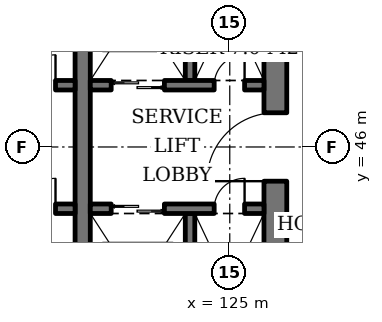
"""IFC4 building model, lengths in metres.
Left out: names, types, materials, properties, quantities, classifications, styles, units other than length and angle.
Written with IfcOpenShell. Run it as: python <this file> out.ifc"""

import sys

from ifc_helpers import new_model, si_unit, direction, frame, frame_2d, origin, place, context, subcontext, project, spatial, rectangle, extrude, element, fill, save


model = new_model("IFC4")
c1 = context("Model", 3, precision=1e-05, world=origin(), true_north=direction((0.0, 1.0)))
c2 = subcontext(c1, "Body", "Model", "MODEL_VIEW")
j1 = project(units=[si_unit("LENGTHUNIT", "METRE"), si_unit("PLANEANGLEUNIT", "RADIAN")], contexts=[c1])
p1 = place(None, origin())
s1 = spatial("IfcSite", under=j1, at=p1, CompositionType="ELEMENT")
p2 = place(p1, origin())
s2 = spatial("IfcBuilding", under=s1, at=p2, CompositionType="ELEMENT")
p3 = place(p2, origin())
s3 = spatial("IfcBuildingStorey", under=s2, at=p3, CompositionType="ELEMENT", Elevation=0.0)
p4 = place(p3, frame((126.2, 37.1, 0.0), z_axis=(0.0, 0.0, 1.0), x_axis=(0.0, 1.0, 0.0)))
e1 = element("IfcWall", 1, at=p4, inside=s3, PredefinedType="SHEAR", context=c2, shape_type="SweptSolid", body=[
    extrude(rectangle(XDim=17.8, YDim=0.6, at=frame_2d((8.9, 0.0))), origin(), (0.0, 0.0, 1.0), 6.0),
])
p5 = place(p4, frame((8.0, 0.0, 0.0)))
e2 = element("IfcOpeningElement", 2, at=p5, cuts=e1, PredefinedType="OPENING", context=c2, shape_type="SweptSolid", body=[
    extrude(rectangle(XDim=1.8, YDim=2.4, at=frame_2d((0.9, 1.2))), frame((0.0, 0.31, 0.0), z_axis=(0.0, -1.0, 0.0), x_axis=(1.0, 0.0, 0.0)), (0.0, 0.0, 1.0), 0.62),
])
p6 = place(p3, frame((121.13, 40.4, 0.0), z_axis=(0.0, 0.0, 1.0), x_axis=(0.0, 1.0, 0.0)))
e3 = element("IfcWall", 3, at=p6, inside=s3, PredefinedType="SHEAR", context=c2, shape_type="SweptSolid", body=[
    extrude(rectangle(XDim=11.2, YDim=0.4, at=frame_2d((5.6, 0.0))), origin(), (0.0, 0.0, 1.0), 6.0),
])
p7 = place(p3, frame((108.1, 47.625, 0.0), z_axis=(0.0, 0.0, 1.0), x_axis=(1.0, 0.0, 0.0)))
e4 = element("IfcWall", 4, at=p7, inside=s3, PredefinedType="SHEAR", context=c2, shape_type="SweptSolid", body=[
    extrude(rectangle(XDim=12.83, YDim=0.25, at=frame_2d((6.415, 0.0))), origin(), (0.0, 0.0, 1.0), 6.0),
])
p8 = place(p7, frame((0.7, 0.0, 0.0)))
e5 = element("IfcOpeningElement", 5, at=p8, cuts=e4, PredefinedType="OPENING", context=c2, shape_type="SweptSolid", body=[
    extrude(rectangle(XDim=1.1, YDim=2.2, at=frame_2d((0.55, 1.1))), frame((0.0, 0.135, 0.0), z_axis=(0.0, -1.0, 0.0), x_axis=(1.0, 0.0, 0.0)), (0.0, 0.0, 1.0), 0.27),
])
p9 = place(p7, frame((3.45, 0.0, 0.0)))
e6 = element("IfcOpeningElement", 6, at=p9, cuts=e4, PredefinedType="OPENING", context=c2, shape_type="SweptSolid", body=[
    extrude(rectangle(XDim=1.1, YDim=2.2, at=frame_2d((0.55, 1.1))), frame((0.0, 0.135, 0.0), z_axis=(0.0, -1.0, 0.0), x_axis=(1.0, 0.0, 0.0)), (0.0, 0.0, 1.0), 0.27),
])
p10 = place(p7, frame((6.2, 0.0, 0.0)))
e7 = element("IfcOpeningElement", 7, at=p10, cuts=e4, PredefinedType="OPENING", context=c2, shape_type="SweptSolid", body=[
    extrude(rectangle(XDim=1.1, YDim=2.2, at=frame_2d((0.55, 1.1))), frame((0.0, 0.135, 0.0), z_axis=(0.0, -1.0, 0.0), x_axis=(1.0, 0.0, 0.0)), (0.0, 0.0, 1.0), 0.27),
])
p11 = place(p7, frame((8.95, 0.0, 0.0)))
e8 = element("IfcOpeningElement", 8, at=p11, cuts=e4, PredefinedType="OPENING", context=c2, shape_type="SweptSolid", body=[
    extrude(rectangle(XDim=1.1, YDim=2.2, at=frame_2d((0.55, 1.1))), frame((0.0, 0.135, 0.0), z_axis=(0.0, -1.0, 0.0), x_axis=(1.0, 0.0, 0.0)), (0.0, 0.0, 1.0), 0.27),
])
p12 = place(p7, frame((11.515, 0.0, 0.0)))
e9 = element("IfcOpeningElement", 9, at=p12, cuts=e4, PredefinedType="OPENING", context=c2, shape_type="SweptSolid", body=[
    extrude(rectangle(XDim=0.8, YDim=2.0, at=frame_2d((0.4, 1.0))), frame((0.0, 0.135, 0.0), z_axis=(0.0, -1.0, 0.0), x_axis=(1.0, 0.0, 0.0)), (0.0, 0.0, 1.0), 0.27),
])
p13 = place(p3, frame((108.1, 44.375, 0.0), z_axis=(0.0, 0.0, 1.0), x_axis=(1.0, 0.0, 0.0)))
e10 = element("IfcWall", 10, at=p13, inside=s3, PredefinedType="SHEAR", context=c2, shape_type="SweptSolid", body=[
    extrude(rectangle(XDim=12.83, YDim=0.25, at=frame_2d((6.415, 0.0))), origin(), (0.0, 0.0, 1.0), 6.0),
])
p14 = place(p13, frame((0.7, 0.0, 0.0)))
e11 = element("IfcOpeningElement", 11, at=p14, cuts=e10, PredefinedType="OPENING", context=c2, shape_type="SweptSolid", body=[
    extrude(rectangle(XDim=1.1, YDim=2.2, at=frame_2d((0.55, 1.1))), frame((0.0, 0.135, 0.0), z_axis=(0.0, -1.0, 0.0), x_axis=(1.0, 0.0, 0.0)), (0.0, 0.0, 1.0), 0.27),
])
p15 = place(p13, frame((3.45, 0.0, 0.0)))
e12 = element("IfcOpeningElement", 12, at=p15, cuts=e10, PredefinedType="OPENING", context=c2, shape_type="SweptSolid", body=[
    extrude(rectangle(XDim=1.1, YDim=2.2, at=frame_2d((0.55, 1.1))), frame((0.0, 0.135, 0.0), z_axis=(0.0, -1.0, 0.0), x_axis=(1.0, 0.0, 0.0)), (0.0, 0.0, 1.0), 0.27),
])
p16 = place(p13, frame((6.2, 0.0, 0.0)))
e13 = element("IfcOpeningElement", 13, at=p16, cuts=e10, PredefinedType="OPENING", context=c2, shape_type="SweptSolid", body=[
    extrude(rectangle(XDim=1.1, YDim=2.2, at=frame_2d((0.55, 1.1))), frame((0.0, 0.135, 0.0), z_axis=(0.0, -1.0, 0.0), x_axis=(1.0, 0.0, 0.0)), (0.0, 0.0, 1.0), 0.27),
])
p17 = place(p13, frame((9.0, 0.0, 0.0)))
e14 = element("IfcOpeningElement", 14, at=p17, cuts=e10, PredefinedType="OPENING", context=c2, shape_type="SweptSolid", body=[
    extrude(rectangle(XDim=1.0, YDim=2.1, at=frame_2d((0.5, 1.05))), frame((0.0, 0.135, 0.0), z_axis=(0.0, -1.0, 0.0), x_axis=(1.0, 0.0, 0.0)), (0.0, 0.0, 1.0), 0.27),
])
p18 = place(p13, frame((11.515, 0.0, 0.0)))
e15 = element("IfcOpeningElement", 15, at=p18, cuts=e10, PredefinedType="OPENING", context=c2, shape_type="SweptSolid", body=[
    extrude(rectangle(XDim=0.8, YDim=2.0, at=frame_2d((0.4, 1.0))), frame((0.0, 0.135, 0.0), z_axis=(0.0, -1.0, 0.0), x_axis=(1.0, 0.0, 0.0)), (0.0, 0.0, 1.0), 0.27),
])
p19 = place(p3, frame((123.955, 47.75, 0.0), z_axis=(0.0, 0.0, 1.0), x_axis=(0.0, 1.0, 0.0)))
e16 = element("IfcWall", 16, at=p19, inside=s3, PredefinedType="SHEAR", context=c2, shape_type="SweptSolid", body=[
    extrude(rectangle(XDim=3.85, YDim=0.25, at=frame_2d((1.925, 0.0))), origin(), (0.0, 0.0, 1.0), 6.0),
])
p20 = place(p3, frame((121.33, 47.625, 0.0), z_axis=(0.0, 0.0, 1.0), x_axis=(1.0, 0.0, 0.0)))
e17 = element("IfcWall", 17, at=p20, inside=s3, PredefinedType="SHEAR", context=c2, shape_type="SweptSolid", body=[
    extrude(rectangle(XDim=4.57, YDim=0.25, at=frame_2d((2.285, 0.0))), origin(), (0.0, 0.0, 1.0), 6.0),
])
p21 = place(p20, frame((0.55, 0.0, 0.0)))
e18 = element("IfcOpeningElement", 18, at=p21, cuts=e17, PredefinedType="OPENING", context=c2, shape_type="SweptSolid", body=[
    extrude(rectangle(XDim=1.4, YDim=2.4, at=frame_2d((0.7, 1.2))), frame((0.0, 0.135, 0.0), z_axis=(0.0, -1.0, 0.0), x_axis=(1.0, 0.0, 0.0)), (0.0, 0.0, 1.0), 0.27),
])
p22 = place(p20, frame((3.26, 0.0, 0.0)))
e19 = element("IfcOpeningElement", 19, at=p22, cuts=e17, PredefinedType="OPENING", context=c2, shape_type="SweptSolid", body=[
    extrude(rectangle(XDim=0.8, YDim=2.0, at=frame_2d((0.4, 1.0))), frame((0.0, 0.135, 0.0), z_axis=(0.0, -1.0, 0.0), x_axis=(1.0, 0.0, 0.0)), (0.0, 0.0, 1.0), 0.27),
])
p23 = place(p3, frame((123.955, 44.25, 0.0), z_axis=(0.0, 0.0, 1.0), x_axis=(0.0, -1.0, 0.0)))
e20 = element("IfcWall", 20, at=p23, inside=s3, PredefinedType="SHEAR", context=c2, shape_type="SweptSolid", body=[
    extrude(rectangle(XDim=3.85, YDim=0.25, at=frame_2d((1.925, 0.0))), origin(), (0.0, 0.0, 1.0), 6.0),
])
p24 = place(p3, frame((121.33, 44.375, 0.0), z_axis=(0.0, 0.0, 1.0), x_axis=(1.0, 0.0, 0.0)))
e21 = element("IfcWall", 21, at=p24, inside=s3, PredefinedType="SHEAR", context=c2, shape_type="SweptSolid", body=[
    extrude(rectangle(XDim=4.57, YDim=0.25, at=frame_2d((2.285, 0.0))), origin(), (0.0, 0.0, 1.0), 6.0),
])
p25 = place(p24, frame((0.55, 0.0, 0.0)))
e22 = element("IfcOpeningElement", 22, at=p25, cuts=e21, PredefinedType="OPENING", context=c2, shape_type="SweptSolid", body=[
    extrude(rectangle(XDim=1.4, YDim=2.4, at=frame_2d((0.7, 1.2))), frame((0.0, 0.135, 0.0), z_axis=(0.0, -1.0, 0.0), x_axis=(1.0, 0.0, 0.0)), (0.0, 0.0, 1.0), 0.27),
])
p26 = place(p24, frame((3.26, 0.0, 0.0)))
e23 = element("IfcOpeningElement", 23, at=p26, cuts=e21, PredefinedType="OPENING", context=c2, shape_type="SweptSolid", body=[
    extrude(rectangle(XDim=0.8, YDim=2.0, at=frame_2d((0.4, 1.0))), frame((0.0, 0.135, 0.0), z_axis=(0.0, -1.0, 0.0), x_axis=(1.0, 0.0, 0.0)), (0.0, 0.0, 1.0), 0.27),
])
p27 = place(p12, origin())
e24 = element("IfcDoor", 24, at=p27, inside=s3, OperationType="SINGLE_SWING_RIGHT", PredefinedType="DOOR", context=c2, shape_type="SweptSolid", body=[
    extrude(rectangle(XDim=0.8, YDim=2.0, at=frame_2d((0.4, 1.0))), frame((0.0, 0.025, 0.0), z_axis=(0.0, -1.0, 0.0), x_axis=(1.0, 0.0, 0.0)), (0.0, 0.0, 1.0), 0.05),
])
fill(e9, e24)
p28 = place(p18, origin())
e25 = element("IfcDoor", 25, at=p28, inside=s3, OperationType="SINGLE_SWING_RIGHT", PredefinedType="DOOR", context=c2, shape_type="SweptSolid", body=[
    extrude(rectangle(XDim=0.8, YDim=2.0, at=frame_2d((0.4, 1.0))), frame((0.0, 0.025, 0.0), z_axis=(0.0, -1.0, 0.0), x_axis=(1.0, 0.0, 0.0)), (0.0, 0.0, 1.0), 0.05),
])
fill(e15, e25)
p29 = place(p21, origin())
e26 = element("IfcDoor", 26, at=p29, inside=s3, OperationType="DOUBLE_DOOR_SLIDING", PredefinedType="DOOR", context=c2, shape_type="SweptSolid", body=[
    extrude(rectangle(XDim=1.4, YDim=2.4, at=frame_2d((0.7, 1.2))), frame((0.0, 0.025, 0.0), z_axis=(0.0, -1.0, 0.0), x_axis=(1.0, 0.0, 0.0)), (0.0, 0.0, 1.0), 0.05),
])
fill(e18, e26)
p30 = place(p22, origin())
e27 = element("IfcDoor", 27, at=p30, inside=s3, OperationType="SINGLE_SWING_RIGHT", PredefinedType="DOOR", context=c2, shape_type="SweptSolid", body=[
    extrude(rectangle(XDim=0.8, YDim=2.0, at=frame_2d((0.4, 1.0))), frame((0.0, 0.025, 0.0), z_axis=(0.0, -1.0, 0.0), x_axis=(1.0, 0.0, 0.0)), (0.0, 0.0, 1.0), 0.05),
])
fill(e19, e27)
p31 = place(p25, origin())
e28 = element("IfcDoor", 28, at=p31, inside=s3, OperationType="DOUBLE_DOOR_SLIDING", PredefinedType="DOOR", context=c2, shape_type="SweptSolid", body=[
    extrude(rectangle(XDim=1.4, YDim=2.4, at=frame_2d((0.7, 1.2))), frame((0.0, 0.025, 0.0), z_axis=(0.0, -1.0, 0.0), x_axis=(1.0, 0.0, 0.0)), (0.0, 0.0, 1.0), 0.05),
])
fill(e22, e28)
p32 = place(p26, origin())
e29 = element("IfcDoor", 29, at=p32, inside=s3, OperationType="SINGLE_SWING_RIGHT", PredefinedType="DOOR", context=c2, shape_type="SweptSolid", body=[
    extrude(rectangle(XDim=0.8, YDim=2.0, at=frame_2d((0.4, 1.0))), frame((0.0, 0.025, 0.0), z_axis=(0.0, -1.0, 0.0), x_axis=(1.0, 0.0, 0.0)), (0.0, 0.0, 1.0), 0.05),
])
fill(e23, e29)
p33 = place(p5, origin())
e30 = element("IfcDoor", 30, at=p33, inside=s3, OperationType="DOUBLE_DOOR_SINGLE_SWING", PredefinedType="DOOR", context=c2, shape_type="SweptSolid", body=[
    extrude(rectangle(XDim=1.8, YDim=2.4, at=frame_2d((0.9, 1.2))), frame((0.0, 0.025, 0.0), z_axis=(0.0, -1.0, 0.0), x_axis=(1.0, 0.0, 0.0)), (0.0, 0.0, 1.0), 0.05),
])
fill(e2, e30)
save(model, sys.argv[1])
